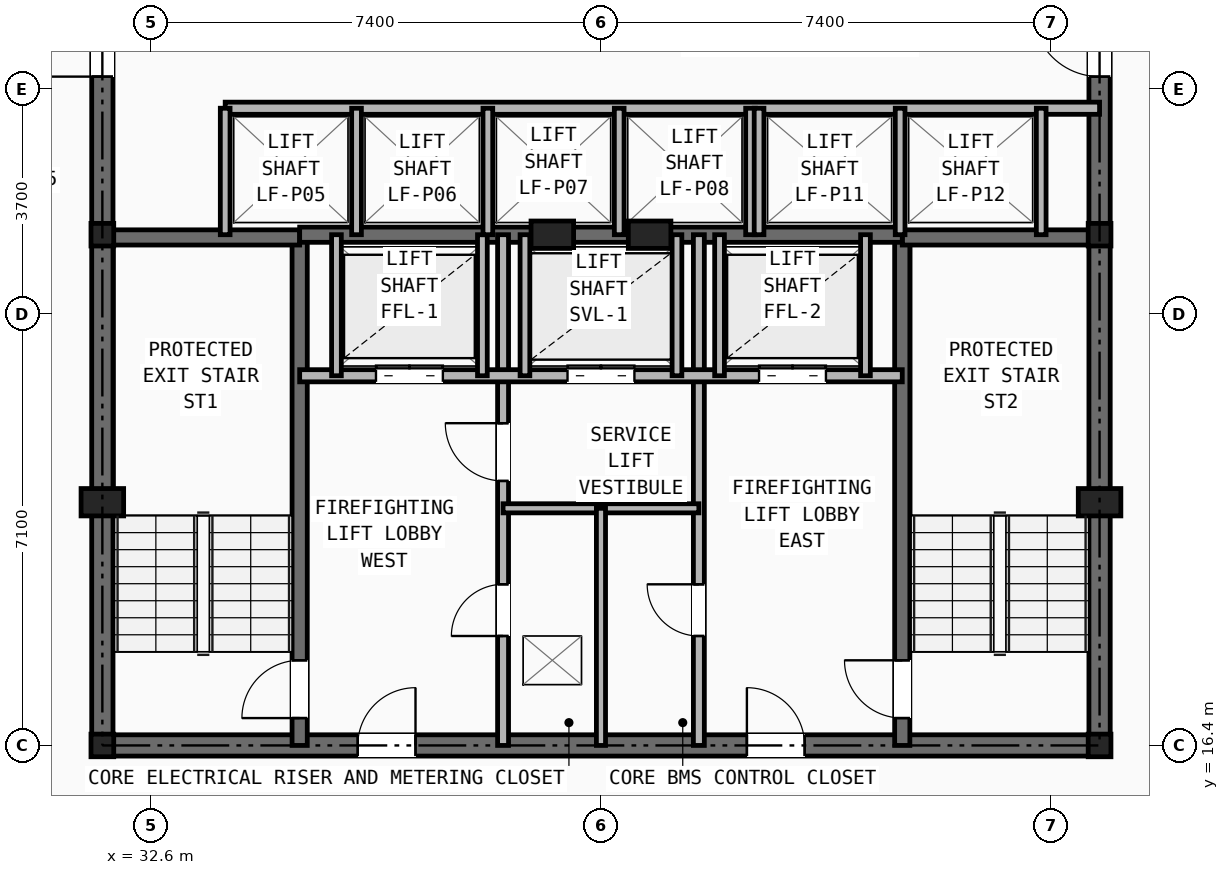
"""IFC4 building model, lengths in metres.
Left out: names, types, materials, properties, quantities, classifications, styles, units other than length and angle.
Written with IfcOpenShell. Run it as: python <this file> out.ifc"""

import sys

from ifc_helpers import new_model, si_unit, direction, frame, frame_2d, origin, origin_2d, place, context, subcontext, project, spatial, rectangle, i_section, extrude, element, fill, save


model = new_model("IFC4")
c1 = context("Model", 3, precision=1e-05, world=origin(), true_north=direction((0.0, 1.0)))
c2 = subcontext(c1, "Body", "Model", "MODEL_VIEW")
j1 = project(units=[si_unit("LENGTHUNIT", "METRE"), si_unit("PLANEANGLEUNIT", "RADIAN")], contexts=[c1])
p1 = place(None, origin())
s1 = spatial("IfcSite", under=j1, at=p1, CompositionType="ELEMENT")
p2 = place(p1, origin())
s2 = spatial("IfcBuilding", under=s1, at=p2, CompositionType="ELEMENT")
p3 = place(p2, frame((0.0, 0.0, 59.2)))
s3 = spatial("IfcBuildingStorey", under=s2, at=p3, CompositionType="ELEMENT", Elevation=59.2)
for number, where, z_axis, x_axis in (
    (1, (31.8, 16.4, 0.0), (0.0, 0.0, 1.0), (1.0, 0.0, 0.0)),
    (2, (48.2, 16.4, 0.0), (0.0, 0.0, 1.0), (1.0, 0.0, 0.0)),
    (3, (31.8, 24.8, 0.0), (0.0, 0.0, 1.0), (1.0, 0.0, 0.0)),
    (4, (48.2, 24.8, 0.0), (0.0, 0.0, 1.0), (1.0, 0.0, 0.0)),
):
    element("IfcColumn", number, at=place(p3, frame(where, z_axis=z_axis, x_axis=x_axis)), inside=s3, PredefinedType="COLUMN", context=c2, shape_type="SweptSolid", body=[
        extrude(i_section(OverallWidth=0.374, OverallDepth=0.372, WebThickness=0.016, FlangeThickness=0.026, at=origin_2d()), origin(), (0.0, 0.0, 1.0), 3.2),
    ])
for number, where, z_axis, x_axis in (
    (5, (31.8, 20.4, 0.0), (0.0, 0.0, 1.0), (1.0, 0.0, 0.0)),
    (6, (48.2, 20.4, 0.0), (0.0, 0.0, 1.0), (1.0, 0.0, 0.0)),
    (7, (39.2, 24.8, 0.0), (0.0, 0.0, 1.0), (1.0, 0.0, 0.0)),
    (8, (40.8, 24.8, 0.0), (0.0, 0.0, 1.0), (1.0, 0.0, 0.0)),
):
    element("IfcColumn", number, at=place(p3, frame(where, z_axis=z_axis, x_axis=x_axis)), inside=s3, PredefinedType="PILASTER", context=c2, shape_type="SweptSolid", body=[
        extrude(rectangle(XDim=0.7, YDim=0.45, at=origin_2d()), origin(), (0.0, 0.0, 1.0), 3.2),
    ])
p4 = place(p3, frame((31.8, 16.4, 0.0), z_axis=(0.0, 0.0, 1.0), x_axis=(1.0, 0.0, 0.0)))
e9 = element("IfcWall", 9, at=p4, inside=s3, PredefinedType="SHEAR", context=c2, shape_type="SweptSolid", body=[
    extrude(rectangle(XDim=16.4, YDim=0.35, at=frame_2d((8.2, 0.0))), origin(), (0.0, 0.0, 1.0), 2.98),
])
p5 = place(p4, frame((4.2, 0.0, 0.0)))
e10 = element("IfcOpeningElement", 10, at=p5, cuts=e9, PredefinedType="OPENING", context=c2, shape_type="SweptSolid", body=[
    extrude(rectangle(XDim=0.95, YDim=2.1, at=frame_2d((0.475, 1.05))), frame((0.0, 0.185, 0.0), z_axis=(0.0, -1.0, 0.0), x_axis=(1.0, 0.0, 0.0)), (0.0, 0.0, 1.0), 0.37),
])
p6 = place(p4, frame((10.6, 0.0, 0.0)))
e11 = element("IfcOpeningElement", 11, at=p6, cuts=e9, PredefinedType="OPENING", context=c2, shape_type="SweptSolid", body=[
    extrude(rectangle(XDim=0.95, YDim=2.1, at=frame_2d((0.475, 1.05))), frame((0.0, 0.185, 0.0), z_axis=(0.0, -1.0, 0.0), x_axis=(1.0, 0.0, 0.0)), (0.0, 0.0, 1.0), 0.37),
])
p7 = place(p3, frame((31.8, 16.4, 0.0), z_axis=(0.0, 0.0, 1.0), x_axis=(0.0, 1.0, 0.0)))
e12 = element("IfcWall", 12, at=p7, inside=s3, PredefinedType="SHEAR", context=c2, shape_type="SweptSolid", body=[
    extrude(rectangle(XDim=14.8, YDim=0.35, at=frame_2d((7.4, 0.0))), origin(), (0.0, 0.0, 1.0), 2.98),
])
p8 = place(p7, frame((11.0, 0.0, 0.0)))
e13 = element("IfcOpeningElement", 13, at=p8, cuts=e12, PredefinedType="OPENING", context=c2, shape_type="SweptSolid", body=[
    extrude(rectangle(XDim=1.1, YDim=2.15, at=frame_2d((0.55, 1.075))), frame((0.0, 0.185, 0.0), z_axis=(0.0, -1.0, 0.0), x_axis=(1.0, 0.0, 0.0)), (0.0, 0.0, 1.0), 0.37),
])
p9 = place(p3, frame((48.2, 16.4, 0.0), z_axis=(0.0, 0.0, 1.0), x_axis=(0.0, 1.0, 0.0)))
e14 = element("IfcWall", 14, at=p9, inside=s3, PredefinedType="SHEAR", context=c2, shape_type="SweptSolid", body=[
    extrude(rectangle(XDim=14.8, YDim=0.35, at=frame_2d((7.4, 0.0))), origin(), (0.0, 0.0, 1.0), 2.98),
])
p10 = place(p9, frame((11.0, 0.0, 0.0)))
e15 = element("IfcOpeningElement", 15, at=p10, cuts=e14, PredefinedType="OPENING", context=c2, shape_type="SweptSolid", body=[
    extrude(rectangle(XDim=1.1, YDim=2.15, at=frame_2d((0.55, 1.075))), frame((0.0, 0.185, 0.0), z_axis=(0.0, -1.0, 0.0), x_axis=(1.0, 0.0, 0.0)), (0.0, 0.0, 1.0), 0.37),
])
p11 = place(p3, frame((35.045, 16.4, 0.0), z_axis=(0.0, 0.0, 1.0), x_axis=(0.0, 1.0, 0.0)))
e16 = element("IfcWall", 16, at=p11, inside=s3, PredefinedType="SHEAR", context=c2, shape_type="SweptSolid", body=[
    extrude(rectangle(XDim=8.4, YDim=0.25, at=frame_2d((4.2, 0.0))), origin(), (0.0, 0.0, 1.0), 2.98),
])
p12 = place(p11, frame((0.45, 0.0, 0.0)))
e17 = element("IfcOpeningElement", 17, at=p12, cuts=e16, PredefinedType="OPENING", context=c2, shape_type="SweptSolid", body=[
    extrude(rectangle(XDim=0.95, YDim=2.1, at=frame_2d((0.475, 1.05))), frame((0.0, 0.135, 0.0), z_axis=(0.0, -1.0, 0.0), x_axis=(1.0, 0.0, 0.0)), (0.0, 0.0, 1.0), 0.27),
])
p13 = place(p3, frame((31.8, 24.755, 0.0), z_axis=(0.0, 0.0, 1.0), x_axis=(1.0, 0.0, 0.0)))
e18 = element("IfcWall", 18, at=p13, inside=s3, PredefinedType="SHEAR", context=c2, shape_type="SweptSolid", body=[
    extrude(rectangle(XDim=3.245, YDim=0.25, at=frame_2d((1.623, 0.0))), origin(), (0.0, 0.0, 1.0), 2.98),
])
p14 = place(p3, frame((44.955, 16.4, 0.0), z_axis=(0.0, 0.0, 1.0), x_axis=(0.0, 1.0, 0.0)))
e19 = element("IfcWall", 19, at=p14, inside=s3, PredefinedType="SHEAR", context=c2, shape_type="SweptSolid", body=[
    extrude(rectangle(XDim=8.4, YDim=0.25, at=frame_2d((4.2, 0.0))), origin(), (0.0, 0.0, 1.0), 2.98),
])
p15 = place(p14, frame((0.45, 0.0, 0.0)))
e20 = element("IfcOpeningElement", 20, at=p15, cuts=e19, PredefinedType="OPENING", context=c2, shape_type="SweptSolid", body=[
    extrude(rectangle(XDim=0.95, YDim=2.1, at=frame_2d((0.475, 1.05))), frame((0.0, 0.135, 0.0), z_axis=(0.0, -1.0, 0.0), x_axis=(1.0, 0.0, 0.0)), (0.0, 0.0, 1.0), 0.27),
])
p16 = place(p3, frame((44.955, 24.755, 0.0), z_axis=(0.0, 0.0, 1.0), x_axis=(1.0, 0.0, 0.0)))
e21 = element("IfcWall", 21, at=p16, inside=s3, PredefinedType="SHEAR", context=c2, shape_type="SweptSolid", body=[
    extrude(rectangle(XDim=3.245, YDim=0.25, at=frame_2d((1.623, 0.0))), origin(), (0.0, 0.0, 1.0), 2.98),
])
p17 = place(p3, frame((35.045, 24.8, 0.0), z_axis=(0.0, 0.0, 1.0), x_axis=(1.0, 0.0, 0.0)))
e22 = element("IfcWall", 22, at=p17, inside=s3, PredefinedType="SHEAR", context=c2, shape_type="SweptSolid", body=[
    extrude(rectangle(XDim=9.91, YDim=0.25, at=frame_2d((4.955, 0.0))), origin(), (0.0, 0.0, 1.0), 2.98),
])
p18 = place(p3, frame((38.39, 16.4, 0.0), z_axis=(0.0, 0.0, 1.0), x_axis=(0.0, 1.0, 0.0)))
e23 = element("IfcWall", 23, at=p18, inside=s3, PredefinedType="PARTITIONING", context=c2, shape_type="SweptSolid", body=[
    extrude(rectangle(XDim=8.4, YDim=0.18, at=frame_2d((4.2, 0.0))), origin(), (0.0, 0.0, 1.0), 2.431),
])
p19 = place(p18, frame((1.8, 0.0, 0.0)))
e24 = element("IfcOpeningElement", 24, at=p19, cuts=e23, PredefinedType="OPENING", context=c2, shape_type="SweptSolid", body=[
    extrude(rectangle(XDim=0.85, YDim=2.05, at=frame_2d((0.425, 1.025))), frame((0.0, 0.1, 0.0), z_axis=(0.0, -1.0, 0.0), x_axis=(1.0, 0.0, 0.0)), (0.0, 0.0, 1.0), 0.2),
])
p20 = place(p18, frame((4.35, 0.0, 0.0)))
e25 = element("IfcOpeningElement", 25, at=p20, cuts=e23, PredefinedType="OPENING", context=c2, shape_type="SweptSolid", body=[
    extrude(rectangle(XDim=0.95, YDim=2.1, at=frame_2d((0.475, 1.05))), frame((0.0, 0.1, 0.0), z_axis=(0.0, -1.0, 0.0), x_axis=(1.0, 0.0, 0.0)), (0.0, 0.0, 1.0), 0.2),
])
p21 = place(p3, frame((41.61, 16.4, 0.0), z_axis=(0.0, 0.0, 1.0), x_axis=(0.0, 1.0, 0.0)))
e26 = element("IfcWall", 26, at=p21, inside=s3, PredefinedType="PARTITIONING", context=c2, shape_type="SweptSolid", body=[
    extrude(rectangle(XDim=8.4, YDim=0.18, at=frame_2d((4.2, 0.0))), origin(), (0.0, 0.0, 1.0), 2.431),
])
p22 = place(p21, frame((1.8, 0.0, 0.0)))
e27 = element("IfcOpeningElement", 27, at=p22, cuts=e26, PredefinedType="OPENING", context=c2, shape_type="SweptSolid", body=[
    extrude(rectangle(XDim=0.85, YDim=2.05, at=frame_2d((0.425, 1.025))), frame((0.0, 0.1, 0.0), z_axis=(0.0, -1.0, 0.0), x_axis=(1.0, 0.0, 0.0)), (0.0, 0.0, 1.0), 0.2),
])
p23 = place(p3, frame((35.045, 22.48, 0.0), z_axis=(0.0, 0.0, 1.0), x_axis=(1.0, 0.0, 0.0)))
e28 = element("IfcWall", 28, at=p23, inside=s3, PredefinedType="SOLIDWALL", context=c2, shape_type="SweptSolid", body=[
    extrude(rectangle(XDim=9.91, YDim=0.2, at=frame_2d((4.955, 0.0))), origin(), (0.0, 0.0, 1.0), 2.98),
])
p24 = place(p23, frame((1.255, 0.0, 0.0)))
e29 = element("IfcOpeningElement", 29, at=p24, cuts=e28, PredefinedType="OPENING", context=c2, shape_type="SweptSolid", body=[
    extrude(rectangle(XDim=1.1, YDim=2.15, at=frame_2d((0.55, 1.075))), frame((0.0, 0.11, 0.0), z_axis=(0.0, -1.0, 0.0), x_axis=(1.0, 0.0, 0.0)), (0.0, 0.0, 1.0), 0.22),
])
p25 = place(p23, frame((7.555, 0.0, 0.0)))
e30 = element("IfcOpeningElement", 30, at=p25, cuts=e28, PredefinedType="OPENING", context=c2, shape_type="SweptSolid", body=[
    extrude(rectangle(XDim=1.1, YDim=2.15, at=frame_2d((0.55, 1.075))), frame((0.0, 0.11, 0.0), z_axis=(0.0, -1.0, 0.0), x_axis=(1.0, 0.0, 0.0)), (0.0, 0.0, 1.0), 0.22),
])
p26 = place(p23, frame((4.405, 0.0, 0.0)))
e31 = element("IfcOpeningElement", 31, at=p26, cuts=e28, PredefinedType="OPENING", context=c2, shape_type="SweptSolid", body=[
    extrude(rectangle(XDim=1.1, YDim=2.15, at=frame_2d((0.55, 1.075))), frame((0.0, 0.11, 0.0), z_axis=(0.0, -1.0, 0.0), x_axis=(1.0, 0.0, 0.0)), (0.0, 0.0, 1.0), 0.22),
])
p27 = place(p3, frame((38.39, 20.3, 0.0), z_axis=(0.0, 0.0, 1.0), x_axis=(1.0, 0.0, 0.0)))
e32 = element("IfcWall", 32, at=p27, inside=s3, PredefinedType="PARTITIONING", context=c2, shape_type="SweptSolid", body=[
    extrude(rectangle(XDim=3.22, YDim=0.15, at=frame_2d((1.61, 0.0))), origin(), (0.0, 0.0, 1.0), 2.98),
])
p28 = place(p3, frame((40.0, 16.4, 0.0), z_axis=(0.0, 0.0, 1.0), x_axis=(0.0, 1.0, 0.0)))
e33 = element("IfcWall", 33, at=p28, inside=s3, PredefinedType="PARTITIONING", context=c2, shape_type="SweptSolid", body=[
    extrude(rectangle(XDim=3.9, YDim=0.15, at=frame_2d((1.95, 0.0))), origin(), (0.0, 0.0, 1.0), 2.431),
])
for number, where, z_axis, x_axis in (
    (34, (35.65, 22.48, 0.0), (0.0, 0.0, 1.0), (0.0, 1.0, 0.0)),
    (35, (38.05, 22.48, 0.0), (0.0, 0.0, 1.0), (0.0, 1.0, 0.0)),
    (36, (41.95, 22.48, 0.0), (0.0, 0.0, 1.0), (0.0, 1.0, 0.0)),
    (37, (44.35, 22.48, 0.0), (0.0, 0.0, 1.0), (0.0, 1.0, 0.0)),
    (38, (38.75, 22.48, 0.0), (0.0, 0.0, 1.0), (0.0, 1.0, 0.0)),
    (39, (41.25, 22.48, 0.0), (0.0, 0.0, 1.0), (0.0, 1.0, 0.0)),
):
    element("IfcWall", number, at=place(p3, frame(where, z_axis=z_axis, x_axis=x_axis)), inside=s3, PredefinedType="SOLIDWALL", context=c2, shape_type="SweptSolid", body=[
        extrude(rectangle(XDim=2.32, YDim=0.16, at=frame_2d((1.16, 0.0))), origin(), (0.0, 0.0, 1.0), 2.98),
    ])
p29 = place(p3, frame((33.82, 26.88, 0.0), z_axis=(0.0, 0.0, 1.0), x_axis=(1.0, 0.0, 0.0)))
e40 = element("IfcWall", 40, at=p29, inside=s3, PredefinedType="SOLIDWALL", context=c2, shape_type="SweptSolid", body=[
    extrude(rectangle(XDim=14.38, YDim=0.2, at=frame_2d((7.19, 0.0))), origin(), (0.0, 0.0, 1.0), 2.431),
])
for number, where, z_axis, x_axis in (
    (41, (33.82, 24.8, 0.0), (0.0, 0.0, 1.0), (0.0, 1.0, 0.0)),
    (42, (35.98, 24.8, 0.0), (0.0, 0.0, 1.0), (0.0, 1.0, 0.0)),
    (43, (38.14, 24.8, 0.0), (0.0, 0.0, 1.0), (0.0, 1.0, 0.0)),
    (44, (40.3, 24.8, 0.0), (0.0, 0.0, 1.0), (0.0, 1.0, 0.0)),
    (45, (42.46, 24.8, 0.0), (0.0, 0.0, 1.0), (0.0, 1.0, 0.0)),
    (46, (42.6, 24.8, 0.0), (0.0, 0.0, 1.0), (0.0, 1.0, 0.0)),
    (47, (44.92, 24.8, 0.0), (0.0, 0.0, 1.0), (0.0, 1.0, 0.0)),
    (48, (47.24, 24.8, 0.0), (0.0, 0.0, 1.0), (0.0, 1.0, 0.0)),
):
    element("IfcWall", number, at=place(p3, frame(where, z_axis=z_axis, x_axis=x_axis)), inside=s3, PredefinedType="SOLIDWALL", context=c2, shape_type="SweptSolid", body=[
        extrude(rectangle(XDim=2.08, YDim=0.16, at=frame_2d((1.04, 0.0))), origin(), (0.0, 0.0, 1.0), 2.98),
    ])
p30 = place(p19, origin())
e49 = element("IfcDoor", 49, at=p30, inside=s3, OperationType="SINGLE_SWING_LEFT", PredefinedType="DOOR", context=c2, shape_type="SweptSolid", body=[
    extrude(rectangle(XDim=0.85, YDim=2.05, at=frame_2d((0.425, 1.025))), frame((0.0, 0.025, 0.0), z_axis=(0.0, -1.0, 0.0), x_axis=(1.0, 0.0, 0.0)), (0.0, 0.0, 1.0), 0.05),
])
fill(e24, e49)
p31 = place(p22, origin())
e50 = element("IfcDoor", 50, at=p31, inside=s3, OperationType="SINGLE_SWING_RIGHT", PredefinedType="DOOR", context=c2, shape_type="SweptSolid", body=[
    extrude(rectangle(XDim=0.85, YDim=2.05, at=frame_2d((0.425, 1.025))), frame((0.0, 0.025, 0.0), z_axis=(0.0, -1.0, 0.0), x_axis=(1.0, 0.0, 0.0)), (0.0, 0.0, 1.0), 0.05),
])
fill(e27, e50)
p32 = place(p20, origin())
e51 = element("IfcDoor", 51, at=p32, inside=s3, OperationType="SINGLE_SWING_RIGHT", PredefinedType="DOOR", context=c2, shape_type="SweptSolid", body=[
    extrude(rectangle(XDim=0.95, YDim=2.1, at=frame_2d((0.475, 1.05))), frame((0.0, 0.025, 0.0), z_axis=(0.0, -1.0, 0.0), x_axis=(1.0, 0.0, 0.0)), (0.0, 0.0, 1.0), 0.05),
])
fill(e25, e51)
p33 = place(p12, origin())
e52 = element("IfcDoor", 52, at=p33, inside=s3, OperationType="SINGLE_SWING_LEFT", PredefinedType="DOOR", context=c2, shape_type="SweptSolid", body=[
    extrude(rectangle(XDim=0.95, YDim=2.1, at=frame_2d((0.475, 1.05))), frame((0.0, 0.025, 0.0), z_axis=(0.0, -1.0, 0.0), x_axis=(1.0, 0.0, 0.0)), (0.0, 0.0, 1.0), 0.05),
])
fill(e17, e52)
p34 = place(p15, origin())
e53 = element("IfcDoor", 53, at=p34, inside=s3, OperationType="SINGLE_SWING_RIGHT", PredefinedType="DOOR", context=c2, shape_type="SweptSolid", body=[
    extrude(rectangle(XDim=0.95, YDim=2.1, at=frame_2d((0.475, 1.05))), frame((0.0, 0.025, 0.0), z_axis=(0.0, -1.0, 0.0), x_axis=(1.0, 0.0, 0.0)), (0.0, 0.0, 1.0), 0.05),
])
fill(e20, e53)
p35 = place(p5, origin())
e54 = element("IfcDoor", 54, at=p35, inside=s3, OperationType="SINGLE_SWING_RIGHT", PredefinedType="DOOR", context=c2, shape_type="SweptSolid", body=[
    extrude(rectangle(XDim=0.95, YDim=2.1, at=frame_2d((0.475, 1.05))), frame((0.0, 0.025, 0.0), z_axis=(0.0, -1.0, 0.0), x_axis=(1.0, 0.0, 0.0)), (0.0, 0.0, 1.0), 0.05),
])
fill(e10, e54)
p36 = place(p6, origin())
e55 = element("IfcDoor", 55, at=p36, inside=s3, OperationType="SINGLE_SWING_LEFT", PredefinedType="DOOR", context=c2, shape_type="SweptSolid", body=[
    extrude(rectangle(XDim=0.95, YDim=2.1, at=frame_2d((0.475, 1.05))), frame((0.0, 0.025, 0.0), z_axis=(0.0, -1.0, 0.0), x_axis=(1.0, 0.0, 0.0)), (0.0, 0.0, 1.0), 0.05),
])
fill(e11, e55)
p37 = place(p24, origin())
e56 = element("IfcDoor", 56, at=p37, inside=s3, OperationType="DOUBLE_DOOR_SLIDING", PredefinedType="DOOR", context=c2, shape_type="SweptSolid", body=[
    extrude(rectangle(XDim=1.1, YDim=2.15, at=frame_2d((0.55, 1.075))), frame((0.0, 0.025, 0.0), z_axis=(0.0, -1.0, 0.0), x_axis=(1.0, 0.0, 0.0)), (0.0, 0.0, 1.0), 0.05),
])
fill(e29, e56)
p38 = place(p25, origin())
e57 = element("IfcDoor", 57, at=p38, inside=s3, OperationType="DOUBLE_DOOR_SLIDING", PredefinedType="DOOR", context=c2, shape_type="SweptSolid", body=[
    extrude(rectangle(XDim=1.1, YDim=2.15, at=frame_2d((0.55, 1.075))), frame((0.0, 0.025, 0.0), z_axis=(0.0, -1.0, 0.0), x_axis=(1.0, 0.0, 0.0)), (0.0, 0.0, 1.0), 0.05),
])
fill(e30, e57)
p39 = place(p26, origin())
e58 = element("IfcDoor", 58, at=p39, inside=s3, OperationType="DOUBLE_DOOR_SLIDING", PredefinedType="DOOR", context=c2, shape_type="SweptSolid", body=[
    extrude(rectangle(XDim=1.1, YDim=2.15, at=frame_2d((0.55, 1.075))), frame((0.0, 0.025, 0.0), z_axis=(0.0, -1.0, 0.0), x_axis=(1.0, 0.0, 0.0)), (0.0, 0.0, 1.0), 0.05),
])
fill(e31, e58)
p40 = place(p8, origin())
e59 = element("IfcDoor", 59, at=p40, inside=s3, OperationType="SINGLE_SWING_LEFT", PredefinedType="DOOR", context=c2, shape_type="SweptSolid", body=[
    extrude(rectangle(XDim=1.1, YDim=2.15, at=frame_2d((0.55, 1.075))), frame((0.0, 0.025, 0.0), z_axis=(0.0, -1.0, 0.0), x_axis=(1.0, 0.0, 0.0)), (0.0, 0.0, 1.0), 0.05),
])
fill(e13, e59)
p41 = place(p10, origin())
e60 = element("IfcDoor", 60, at=p41, inside=s3, OperationType="SINGLE_SWING_RIGHT", PredefinedType="DOOR", context=c2, shape_type="SweptSolid", body=[
    extrude(rectangle(XDim=1.1, YDim=2.15, at=frame_2d((0.55, 1.075))), frame((0.0, 0.025, 0.0), z_axis=(0.0, -1.0, 0.0), x_axis=(1.0, 0.0, 0.0)), (0.0, 0.0, 1.0), 0.05),
])
fill(e15, e60)
save(model, sys.argv[1])
